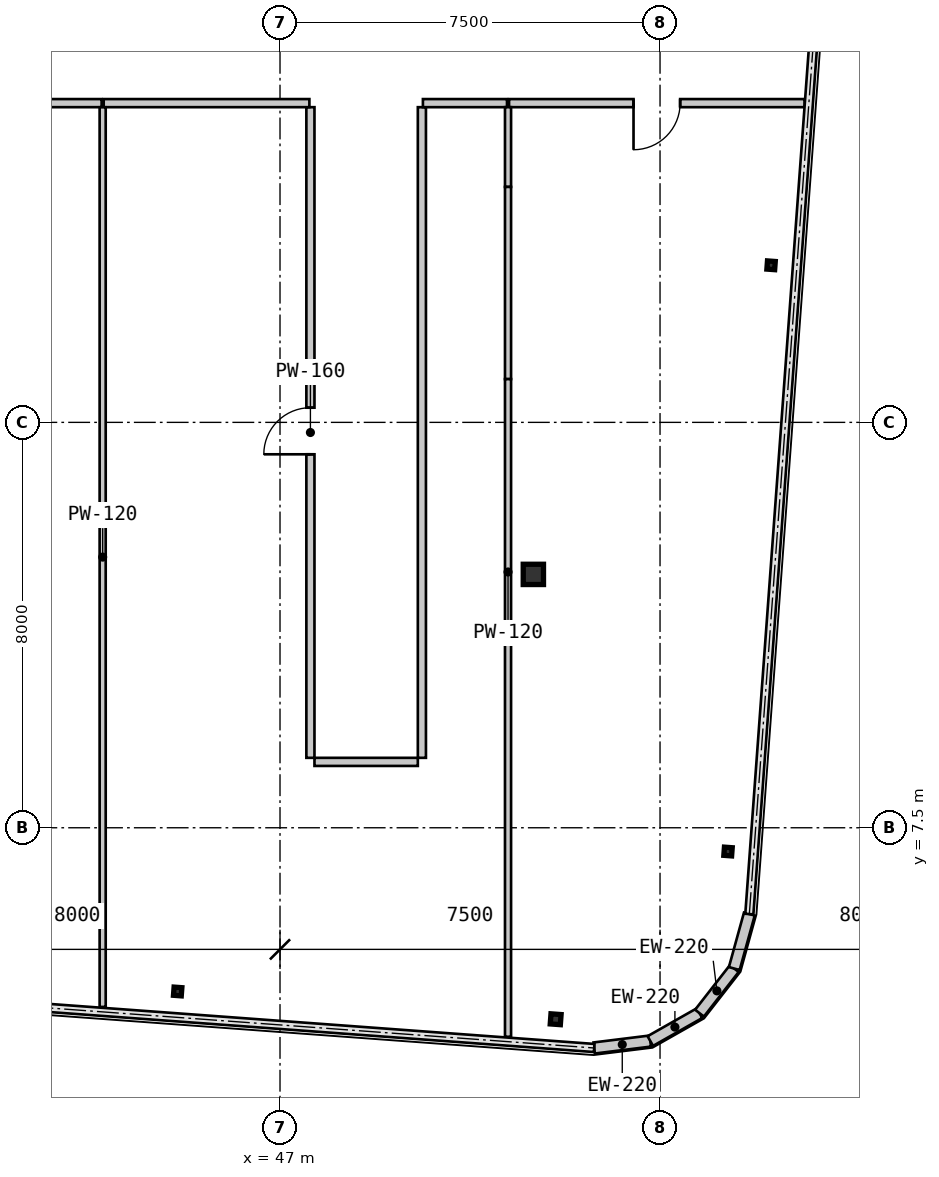
"""IFC4 building model, lengths in metres.
Left out: names, types, materials, properties, quantities, classifications, styles, units other than length and angle.
Written with IfcOpenShell. Run it as: python <this file> out.ifc"""

import sys

from ifc_helpers import new_model, si_unit, direction, frame, frame_2d, origin, origin_2d, place, context, subcontext, project, spatial, rectangle, hollow_rectangle, i_section, extrude, source, transform, mapped, element, fill, save


model = new_model("IFC4")
c1 = context("Model", 3, precision=1e-05, world=origin(), true_north=direction((0.0, 1.0)))
c2 = subcontext(c1, "Body", "Model", "MODEL_VIEW")
j1 = project(units=[si_unit("LENGTHUNIT", "METRE"), si_unit("PLANEANGLEUNIT", "RADIAN")], contexts=[c1])
p1 = place(None, origin())
s1 = spatial("IfcSite", under=j1, at=p1, CompositionType="ELEMENT")
p2 = place(p1, origin())
s2 = spatial("IfcBuilding", under=s1, at=p2, CompositionType="ELEMENT")
p3 = place(p2, frame((0.0, 0.0, 239.75)))
s3 = spatial("IfcBuildingStorey", under=s2, at=p3, CompositionType="ELEMENT", Elevation=239.75)
m1 = source(origin(), c2, "Body", "SweptSolid", [
    extrude(hollow_rectangle(XDim=0.4, YDim=0.4, WallThickness=0.016, at=origin_2d()), origin(), (0.0, 0.0, 1.0), 3.15),
])
p4 = place(p3, frame((52.0, 12.5, 0.0), z_axis=(0.0, 0.0, 1.0), x_axis=(1.0, 0.0, 0.0)))
e1 = element("IfcColumn", 1, at=p4, inside=s3, PredefinedType="COLUMN", context=c2, shape_type="MappedRepresentation", body=[
    mapped(m1, transform((0.0, 0.0, 0.0), scale=1.0)),
])
m2 = source(origin(), c2, "Body", "SweptSolid", [
    extrude(i_section(OverallWidth=0.154, OverallDepth=0.162, WebThickness=0.008, FlangeThickness=0.011, at=origin_2d()), origin(), (0.0, 0.0, 1.0), 3.15),
])
p5 = place(p3, frame((44.98, 4.269, 0.0), z_axis=(0.0, 0.0, 1.0), x_axis=(0.997314477224, -0.073238197128, 0.0)))
e2 = element("IfcColumn", 2, at=p5, inside=s3, PredefinedType="COLUMN", context=c2, shape_type="MappedRepresentation", body=[
    mapped(m2, transform((0.0, 0.0, 0.0), scale=1.0)),
])
m3 = source(origin(), c2, "Body", "SweptSolid", [
    extrude(hollow_rectangle(XDim=0.2, YDim=0.2, WallThickness=0.009, at=origin_2d()), origin(), (0.0, 0.0, 1.0), 3.15),
])
p6 = place(p3, frame((52.44, 3.721, 0.0), z_axis=(0.0, 0.0, 1.0), x_axis=(0.997314477224, -0.073238197128, 0.0)))
e3 = element("IfcColumn", 3, at=p6, inside=s3, PredefinedType="COLUMN", context=c2, shape_type="MappedRepresentation", body=[
    mapped(m3, transform((0.0, 0.0, 0.0), scale=1.0)),
])
for number, where, z_axis, x_axis in (
    (4, (55.842, 7.031, 0.0), (0.0, 0.0, 1.0), (0.997, -0.073, 0.0)),
    (5, (56.691, 18.6, 0.0), (0.0, 0.0, 1.0), (0.997, -0.073, 0.0)),
):
    element("IfcColumn", number, at=place(p3, frame(where, z_axis=z_axis, x_axis=x_axis)), inside=s3, PredefinedType="COLUMN", context=c2, shape_type="MappedRepresentation", body=[
        mapped(m2, transform((0.0, 0.0, 0.0), scale=1.0)),
    ])
m4 = source(origin(), c2, "Body", "SweptSolid", [
    extrude(rectangle(XDim=1.116, YDim=0.22, at=frame_2d((0.558, 0.0))), origin(), (0.0, 0.0, 1.0), 2.93),
])
p7 = place(p3, frame((53.201, 3.154, 0.0), z_axis=(0.0, 0.0, 1.0), x_axis=(0.992438604032, 0.122742076028, 0.0)))
e6 = element("IfcWall", 6, at=p7, inside=s3, PredefinedType="SOLIDWALL", context=c2, shape_type="MappedRepresentation", body=[
    mapped(m4, transform((0.0, 0.0, 0.0), scale=1.0)),
])
m5 = source(origin(), c2, "Body", "SweptSolid", [
    extrude(rectangle(XDim=1.116, YDim=0.22, at=frame_2d((0.558, 0.0))), origin(), (0.0, 0.0, 1.0), 2.93),
])
p8 = place(p3, frame((54.308, 3.291, 0.0), z_axis=(0.0, 0.0, 1.0), x_axis=(0.869893934693, 0.49323882895, 0.0)))
e7 = element("IfcWall", 7, at=p8, inside=s3, PredefinedType="SOLIDWALL", context=c2, shape_type="MappedRepresentation", body=[
    mapped(m5, transform((0.0, 0.0, 0.0), scale=1.0)),
])
for number, where, z_axis, x_axis in (
    (8, (55.279, 3.841, 0.0), (0.0, 0.0, 1.0), (0.615, 0.789, 0.0)),
    (9, (55.965, 4.721, 0.0), (0.0, 0.0, 1.0), (0.266, 0.964, 0.0)),
):
    element("IfcWall", number, at=place(p3, frame(where, z_axis=z_axis, x_axis=x_axis)), inside=s3, PredefinedType="SOLIDWALL", context=c2, shape_type="MappedRepresentation", body=[
        mapped(m4, transform((0.0, 0.0, 0.0), scale=1.0)),
    ])
m6 = source(origin(), c2, "Body", "SweptSolid", [
    extrude(rectangle(XDim=4.209, YDim=0.16, at=frame_2d((2.105, 0.0))), origin(), (0.0, 0.0, 1.0), 2.93),
])
p9 = place(p3, frame((43.48, 21.8, 0.0), z_axis=(0.0, 0.0, 1.0), x_axis=(-1.0, 0.0, 0.0)))
e10 = element("IfcWall", 10, at=p9, inside=s3, PredefinedType="PARTITIONING", context=c2, shape_type="MappedRepresentation", body=[
    mapped(m6, transform((0.0, 0.0, 0.0), scale=1.0)),
])
m7 = source(origin(), c2, "Body", "SweptSolid", [
    extrude(rectangle(XDim=0.92, YDim=2.1, at=frame_2d((0.46, 1.05))), frame((0.0, 0.09, 0.0), z_axis=(0.0, -1.0, 0.0), x_axis=(1.0, 0.0, 0.0)), (0.0, 0.0, 1.0), 0.18),
])
p10 = place(p9, frame((1.645, 0.0, 0.0)))
e11 = element("IfcOpeningElement", 11, at=p10, cuts=e10, PredefinedType="OPENING", context=c2, shape_type="MappedRepresentation", body=[
    mapped(m7, transform((0.0, 0.0, 0.0), scale=1.0)),
])
m8 = source(origin(), c2, "Body", "SweptSolid", [
    extrude(rectangle(XDim=12.84, YDim=0.16, at=frame_2d((6.42, 0.0))), origin(), (0.0, 0.0, 1.0), 2.93),
])
p11 = place(p3, frame((47.6, 8.88, 0.0), z_axis=(0.0, 0.0, 1.0), x_axis=(0.0, 1.0, 0.0)))
e12 = element("IfcWall", 12, at=p11, inside=s3, PredefinedType="PARTITIONING", context=c2, shape_type="MappedRepresentation", body=[
    mapped(m8, transform((0.0, 0.0, 0.0), scale=1.0)),
])
p12 = place(p11, frame((5.99, 0.0, 0.0)))
e13 = element("IfcOpeningElement", 13, at=p12, cuts=e12, PredefinedType="OPENING", context=c2, shape_type="MappedRepresentation", body=[
    mapped(m7, transform((0.0, 0.0, 0.0), scale=1.0)),
])
p13 = place(p3, frame((49.8, 21.72, 0.0), z_axis=(0.0, 0.0, 1.0), x_axis=(0.0, -1.0, 0.0)))
e14 = element("IfcWall", 14, at=p13, inside=s3, PredefinedType="PARTITIONING", context=c2, shape_type="MappedRepresentation", body=[
    mapped(m8, transform((0.0, 0.0, 0.0), scale=1.0)),
])
m9 = source(origin(), c2, "Body", "SweptSolid", [
    extrude(rectangle(XDim=4.06, YDim=0.16, at=frame_2d((2.03, 0.0))), origin(), (0.0, 0.0, 1.0), 2.93),
])
p14 = place(p3, frame((47.58, 21.8, 0.0), z_axis=(0.0, 0.0, 1.0), x_axis=(-1.0, 0.0, 0.0)))
e15 = element("IfcWall", 15, at=p14, inside=s3, PredefinedType="PARTITIONING", context=c2, shape_type="MappedRepresentation", body=[
    mapped(m9, transform((0.0, 0.0, 0.0), scale=1.0)),
])
m10 = source(origin(), c2, "Body", "SweptSolid", [
    extrude(rectangle(XDim=2.04, YDim=0.16, at=frame_2d((1.02, 0.0))), origin(), (0.0, 0.0, 1.0), 2.93),
])
p15 = place(p3, frame((49.72, 8.8, 0.0), z_axis=(0.0, 0.0, 1.0), x_axis=(-1.0, 0.0, 0.0)))
e16 = element("IfcWall", 16, at=p15, inside=s3, PredefinedType="PARTITIONING", context=c2, shape_type="MappedRepresentation", body=[
    mapped(m10, transform((0.0, 0.0, 0.0), scale=1.0)),
])
m11 = source(origin(), c2, "Body", "SweptSolid", [
    extrude(rectangle(XDim=1.659, YDim=0.16, at=frame_2d((0.83, 0.0))), origin(), (0.0, 0.0, 1.0), 2.93),
])
p16 = place(p3, frame((51.48, 21.8, 0.0), z_axis=(0.0, 0.0, 1.0), x_axis=(-1.0, 0.0, 0.0)))
e17 = element("IfcWall", 17, at=p16, inside=s3, PredefinedType="PARTITIONING", context=c2, shape_type="MappedRepresentation", body=[
    mapped(m11, transform((0.0, 0.0, 0.0), scale=1.0)),
])
m12 = source(origin(), c2, "Body", "SweptSolid", [
    extrude(rectangle(XDim=5.833, YDim=0.16, at=frame_2d((2.917, 0.0))), origin(), (0.0, 0.0, 1.0), 2.93),
])
p17 = place(p3, frame((57.353, 21.8, 0.0), z_axis=(0.0, 0.0, 1.0), x_axis=(-1.0, 0.0, 0.0)))
e18 = element("IfcWall", 18, at=p17, inside=s3, PredefinedType="PARTITIONING", context=c2, shape_type="MappedRepresentation", body=[
    mapped(m12, transform((0.0, 0.0, 0.0), scale=1.0)),
])
p18 = place(p17, frame((2.457, 0.0, 0.0)))
e19 = element("IfcOpeningElement", 19, at=p18, cuts=e18, PredefinedType="OPENING", context=c2, shape_type="MappedRepresentation", body=[
    mapped(m7, transform((0.0, 0.0, 0.0), scale=1.0)),
])
m13 = source(origin(), c2, "Body", "SweptSolid", [
    extrude(rectangle(XDim=17.754, YDim=0.12, at=frame_2d((8.877, 0.0))), origin(), (0.0, 0.0, 1.0), 2.93),
])
p19 = place(p3, frame((43.5, 21.718, 0.0), z_axis=(0.0, 0.0, 1.0), x_axis=(0.0, -1.0, 0.0)))
e20 = element("IfcWall", 20, at=p19, inside=s3, PredefinedType="PARTITIONING", context=c2, shape_type="MappedRepresentation", body=[
    mapped(m13, transform((0.0, 0.0, 0.0), scale=1.0)),
])
m14 = source(origin(), c2, "Body", "SweptSolid", [
    extrude(rectangle(XDim=1.574, YDim=0.12, at=frame_2d((0.787, 0.0))), origin(), (0.0, 0.0, 1.0), 2.93),
])
p20 = place(p3, frame((51.5, 21.72, 0.0), z_axis=(0.0, 0.0, 1.0), x_axis=(0.0, -1.0, 0.0)))
e21 = element("IfcWall", 21, at=p20, inside=s3, PredefinedType="PARTITIONING", context=c2, shape_type="MappedRepresentation", body=[
    mapped(m14, transform((0.0, 0.0, 0.0), scale=1.0)),
])
m15 = source(origin(), c2, "Body", "SweptSolid", [
    extrude(rectangle(XDim=3.792, YDim=0.12, at=frame_2d((1.896, 0.0))), origin(), (0.0, 0.0, 1.0), 2.397),
])
p21 = place(p3, frame((51.5, 20.146, 0.0), z_axis=(0.0, 0.0, 1.0), x_axis=(0.0, -1.0, 0.0)))
e22 = element("IfcWall", 22, at=p21, inside=s3, PredefinedType="PARTITIONING", context=c2, shape_type="MappedRepresentation", body=[
    mapped(m15, transform((0.0, 0.0, 0.0), scale=1.0)),
])
m16 = source(origin(), c2, "Body", "SweptSolid", [
    extrude(rectangle(XDim=12.979, YDim=0.12, at=frame_2d((6.489, 0.0))), origin(), (0.0, 0.0, 1.0), 2.93),
])
p22 = place(p3, frame((51.5, 16.354, 0.0), z_axis=(0.0, 0.0, 1.0), x_axis=(0.0, -1.0, 0.0)))
e23 = element("IfcWall", 23, at=p22, inside=s3, PredefinedType="PARTITIONING", context=c2, shape_type="MappedRepresentation", body=[
    mapped(m16, transform((0.0, 0.0, 0.0), scale=1.0)),
])
m17 = source(origin(), c2, "Body", "SweptSolid", [
    extrude(rectangle(XDim=0.92, YDim=2.1, at=frame_2d((0.46, 1.05))), frame((0.0, 0.025, 0.0), z_axis=(0.0, -1.0, 0.0), x_axis=(1.0, 0.0, 0.0)), (0.0, 0.0, 1.0), 0.05),
])
p23 = place(p12, origin())
e24 = element("IfcDoor", 24, at=p23, inside=s3, OperationType="SINGLE_SWING_LEFT", PredefinedType="DOOR", context=c2, shape_type="MappedRepresentation", body=[
    mapped(m17, transform((0.0, 0.0, 0.0), scale=1.0)),
])
fill(e13, e24)
p24 = place(p18, origin())
e25 = element("IfcDoor", 25, at=p24, inside=s3, OperationType="SINGLE_SWING_RIGHT", PredefinedType="DOOR", context=c2, shape_type="MappedRepresentation", body=[
    mapped(m17, transform((0.0, 0.0, 0.0), scale=1.0)),
])
fill(e19, e25)
save(model, sys.argv[1])
